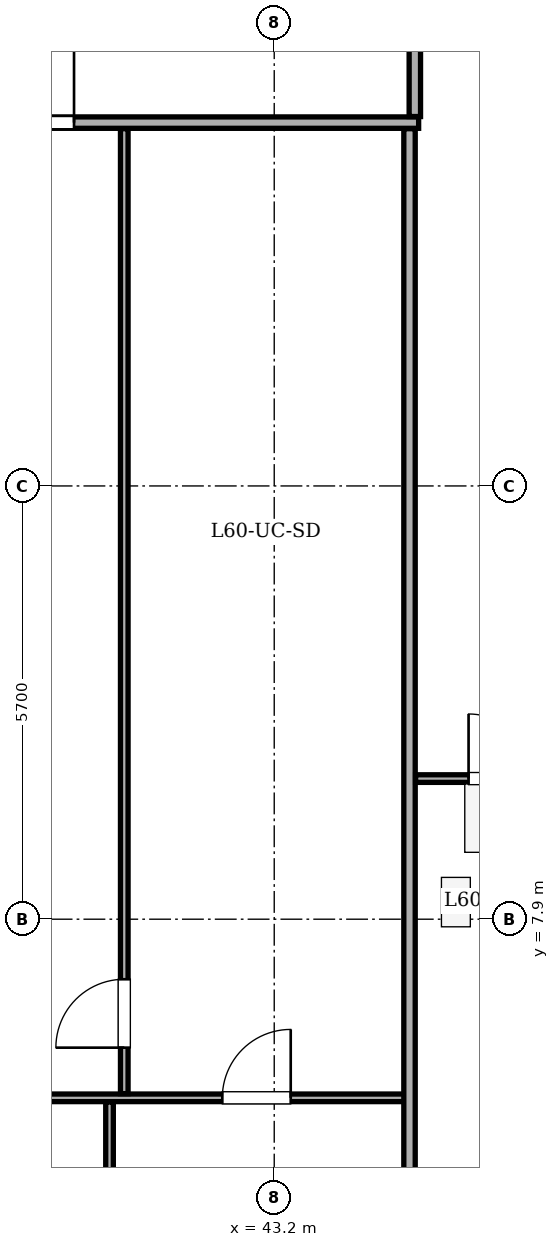
"""IFC4 building model, lengths in metres.
Left out: names, types, materials, properties, quantities, classifications, styles, units other than length and angle.
Written with IfcOpenShell. Run it as: python <this file> out.ifc"""

import sys

from ifc_helpers import new_model, si_unit, direction, frame, frame_2d, origin, place, context, subcontext, project, spatial, rectangle, extrude, element, fill, save


model = new_model("IFC4")
c1 = context("Model", 3, precision=1e-05, world=origin(), true_north=direction((0.0, 1.0)))
c2 = subcontext(c1, "Body", "Model", "MODEL_VIEW")
j1 = project(units=[si_unit("LENGTHUNIT", "METRE"), si_unit("PLANEANGLEUNIT", "RADIAN")], contexts=[c1])
p1 = place(None, origin())
s1 = spatial("IfcSite", under=j1, at=p1, CompositionType="ELEMENT")
p2 = place(p1, origin())
s2 = spatial("IfcBuilding", under=s1, at=p2, CompositionType="ELEMENT")
p3 = place(p2, frame((0.0, 0.0, 231.3)))
s3 = spatial("IfcBuildingStorey", under=s2, at=p3, CompositionType="ELEMENT", Elevation=231.3)
p4 = place(p3, frame((15.08, 18.38, 0.0), z_axis=(0.0, 0.0, 1.0), x_axis=(1.0, 0.0, 0.0)))
e1 = element("IfcWall", 1, at=p4, inside=s3, PredefinedType="PARTITIONING", context=c2, shape_type="SweptSolid", body=[
    extrude(rectangle(XDim=30.02, YDim=0.15, at=frame_2d((15.01, 0.0))), origin(), (0.0, 0.0, 1.0), 3.1),
])
p5 = place(p4, frame((4.385, 0.0, 0.0)))
e2 = element("IfcOpeningElement", 2, at=p5, cuts=e1, PredefinedType="OPENING", context=c2, shape_type="SweptSolid", body=[
    extrude(rectangle(XDim=1.0, YDim=2.1, at=frame_2d((0.5, 1.05))), frame((0.0, 0.085, 0.0), z_axis=(0.0, -1.0, 0.0), x_axis=(1.0, 0.0, 0.0)), (0.0, 0.0, 1.0), 0.17),
])
p6 = place(p4, frame((14.361, 0.0, 0.0)))
e3 = element("IfcOpeningElement", 3, at=p6, cuts=e1, PredefinedType="OPENING", context=c2, shape_type="SweptSolid", body=[
    extrude(rectangle(XDim=1.0, YDim=2.1, at=frame_2d((0.5, 1.05))), frame((0.0, 0.085, 0.0), z_axis=(0.0, -1.0, 0.0), x_axis=(1.0, 0.0, 0.0)), (0.0, 0.0, 1.0), 0.17),
])
p7 = place(p4, frame((24.486, 0.0, 0.0)))
e4 = element("IfcOpeningElement", 4, at=p7, cuts=e1, PredefinedType="OPENING", context=c2, shape_type="SweptSolid", body=[
    extrude(rectangle(XDim=1.0, YDim=2.1, at=frame_2d((0.5, 1.05))), frame((0.0, 0.085, 0.0), z_axis=(0.0, -1.0, 0.0), x_axis=(1.0, 0.0, 0.0)), (0.0, 0.0, 1.0), 0.17),
])
p8 = place(p3, frame((35.233, 5.55, 0.0), z_axis=(0.0, 0.0, 1.0), x_axis=(1.0, 0.0, 0.0)))
e5 = element("IfcWall", 5, at=p8, inside=s3, PredefinedType="PARTITIONING", context=c2, shape_type="SweptSolid", body=[
    extrude(rectangle(XDim=9.787, YDim=0.1, at=frame_2d((4.894, 0.0))), origin(), (0.0, 0.0, 1.0), 3.1),
])
p9 = place(p8, frame((0.625, 0.0, 0.0)))
e6 = element("IfcOpeningElement", 6, at=p9, cuts=e5, PredefinedType="OPENING", context=c2, shape_type="SweptSolid", body=[
    extrude(rectangle(XDim=0.85, YDim=2.05, at=frame_2d((0.425, 1.025))), frame((0.0, 0.06, 0.0), z_axis=(0.0, -1.0, 0.0), x_axis=(1.0, 0.0, 0.0)), (0.0, 0.0, 1.0), 0.12),
])
p10 = place(p8, frame((3.525, 0.0, 0.0)))
e7 = element("IfcOpeningElement", 7, at=p10, cuts=e5, PredefinedType="OPENING", context=c2, shape_type="SweptSolid", body=[
    extrude(rectangle(XDim=0.85, YDim=2.05, at=frame_2d((0.425, 1.025))), frame((0.0, 0.06, 0.0), z_axis=(0.0, -1.0, 0.0), x_axis=(1.0, 0.0, 0.0)), (0.0, 0.0, 1.0), 0.12),
])
p11 = place(p8, frame((7.284, 0.0, 0.0)))
e8 = element("IfcOpeningElement", 8, at=p11, cuts=e5, PredefinedType="OPENING", context=c2, shape_type="SweptSolid", body=[
    extrude(rectangle(XDim=0.9, YDim=2.05, at=frame_2d((0.45, 1.025))), frame((0.0, 0.06, 0.0), z_axis=(0.0, -1.0, 0.0), x_axis=(1.0, 0.0, 0.0)), (0.0, 0.0, 1.0), 0.12),
])
p12 = place(p3, frame((41.227, 5.605, 0.0), z_axis=(0.0, 0.0, 1.0), x_axis=(0.0, 1.0, 0.0)))
e9 = element("IfcWall", 9, at=p12, inside=s3, PredefinedType="PARTITIONING", context=c2, shape_type="SweptSolid", body=[
    extrude(rectangle(XDim=12.695, YDim=0.1, at=frame_2d((6.348, 0.0))), origin(), (0.0, 0.0, 1.0), 3.1),
])
p13 = place(p12, frame((0.605, 0.0, 0.0)))
e10 = element("IfcOpeningElement", 10, at=p13, cuts=e9, PredefinedType="OPENING", context=c2, shape_type="SweptSolid", body=[
    extrude(rectangle(XDim=0.9, YDim=2.05, at=frame_2d((0.45, 1.025))), frame((0.0, 0.06, 0.0), z_axis=(0.0, -1.0, 0.0), x_axis=(1.0, 0.0, 0.0)), (0.0, 0.0, 1.0), 0.12),
])
p14 = place(p3, frame((41.033, 3.045, 0.0), z_axis=(0.0, 0.0, 1.0), x_axis=(0.0, 1.0, 0.0)))
e11 = element("IfcWall", 11, at=p14, inside=s3, PredefinedType="PARTITIONING", context=c2, shape_type="SweptSolid", body=[
    extrude(rectangle(XDim=2.45, YDim=0.1, at=frame_2d((1.225, 0.0))), origin(), (0.0, 0.0, 1.0), 3.1),
])
p15 = place(p3, frame((44.98, 3.045, 0.0), z_axis=(0.0, 0.0, 1.0), x_axis=(0.0, 1.0, 0.0)))
e12 = element("IfcWall", 12, at=p15, inside=s3, PredefinedType="PARTITIONING", context=c2, shape_type="SweptSolid", body=[
    extrude(rectangle(XDim=15.255, YDim=0.15, at=frame_2d((7.627, 0.0))), origin(), (0.0, 0.0, 1.0), 2.725),
])
p16 = place(p3, frame((45.05, 18.46, 0.0), z_axis=(0.0, 0.0, 1.0), x_axis=(0.0, 1.0, 0.0)))
e13 = element("IfcWall", 13, at=p16, inside=s3, PredefinedType="PARTITIONING", context=c2, shape_type="SweptSolid", body=[
    extrude(rectangle(XDim=1.79, YDim=0.15, at=frame_2d((0.895, 0.0))), origin(), (0.0, 0.0, 1.0), 2.725),
])
p17 = place(p3, frame((45.06, 9.75, 0.0), z_axis=(0.0, 0.0, 1.0), x_axis=(1.0, 0.0, 0.0)))
e14 = element("IfcWall", 14, at=p17, inside=s3, PredefinedType="PARTITIONING", context=c2, shape_type="SweptSolid", body=[
    extrude(rectangle(XDim=10.295, YDim=0.1, at=frame_2d((5.147, 0.0))), origin(), (0.0, 0.0, 1.0), 3.1),
])
p18 = place(p17, frame((0.697, 0.0, 0.0)))
e15 = element("IfcOpeningElement", 15, at=p18, cuts=e14, PredefinedType="OPENING", context=c2, shape_type="SweptSolid", body=[
    extrude(rectangle(XDim=0.85, YDim=2.05, at=frame_2d((0.425, 1.025))), frame((0.0, 0.06, 0.0), z_axis=(0.0, -1.0, 0.0), x_axis=(1.0, 0.0, 0.0)), (0.0, 0.0, 1.0), 0.12),
])
p19 = place(p17, frame((3.068, 0.0, 0.0)))
e16 = element("IfcOpeningElement", 16, at=p19, cuts=e14, PredefinedType="OPENING", context=c2, shape_type="SweptSolid", body=[
    extrude(rectangle(XDim=0.85, YDim=2.05, at=frame_2d((0.425, 1.025))), frame((0.0, 0.06, 0.0), z_axis=(0.0, -1.0, 0.0), x_axis=(1.0, 0.0, 0.0)), (0.0, 0.0, 1.0), 0.12),
])
p20 = place(p17, frame((5.384, 0.0, 0.0)))
e17 = element("IfcOpeningElement", 17, at=p20, cuts=e14, PredefinedType="OPENING", context=c2, shape_type="SweptSolid", body=[
    extrude(rectangle(XDim=0.9, YDim=2.05, at=frame_2d((0.45, 1.025))), frame((0.0, 0.06, 0.0), z_axis=(0.0, -1.0, 0.0), x_axis=(1.0, 0.0, 0.0)), (0.0, 0.0, 1.0), 0.12),
])
p21 = place(p17, frame((8.208, 0.0, 0.0)))
e18 = element("IfcOpeningElement", 18, at=p21, cuts=e14, PredefinedType="OPENING", context=c2, shape_type="SweptSolid", body=[
    extrude(rectangle(XDim=0.9, YDim=2.05, at=frame_2d((0.45, 1.025))), frame((0.0, 0.06, 0.0), z_axis=(0.0, -1.0, 0.0), x_axis=(1.0, 0.0, 0.0)), (0.0, 0.0, 1.0), 0.12),
])
p22 = place(p7, origin())
e19 = element("IfcDoor", 19, at=p22, inside=s3, OperationType="SINGLE_SWING_RIGHT", PredefinedType="DOOR", context=c2, shape_type="SweptSolid", body=[
    extrude(rectangle(XDim=1.0, YDim=2.1, at=frame_2d((0.5, 1.05))), frame((0.0, 0.025, 0.0), z_axis=(0.0, -1.0, 0.0), x_axis=(1.0, 0.0, 0.0)), (0.0, 0.0, 1.0), 0.05),
])
fill(e4, e19)
p23 = place(p13, origin())
e20 = element("IfcDoor", 20, at=p23, inside=s3, OperationType="SINGLE_SWING_LEFT", PredefinedType="DOOR", context=c2, shape_type="SweptSolid", body=[
    extrude(rectangle(XDim=0.9, YDim=2.05, at=frame_2d((0.45, 1.025))), frame((0.0, 0.025, 0.0), z_axis=(0.0, -1.0, 0.0), x_axis=(1.0, 0.0, 0.0)), (0.0, 0.0, 1.0), 0.05),
])
fill(e10, e20)
p24 = place(p11, origin())
e21 = element("IfcDoor", 21, at=p24, inside=s3, OperationType="SINGLE_SWING_RIGHT", PredefinedType="DOOR", context=c2, shape_type="SweptSolid", body=[
    extrude(rectangle(XDim=0.9, YDim=2.05, at=frame_2d((0.45, 1.025))), frame((0.0, 0.025, 0.0), z_axis=(0.0, -1.0, 0.0), x_axis=(1.0, 0.0, 0.0)), (0.0, 0.0, 1.0), 0.05),
])
fill(e8, e21)
p25 = place(p18, origin())
e22 = element("IfcDoor", 22, at=p25, inside=s3, OperationType="SINGLE_SWING_LEFT", PredefinedType="DOOR", context=c2, shape_type="SweptSolid", body=[
    extrude(rectangle(XDim=0.85, YDim=2.05, at=frame_2d((0.425, 1.025))), frame((0.0, 0.025, 0.0), z_axis=(0.0, -1.0, 0.0), x_axis=(1.0, 0.0, 0.0)), (0.0, 0.0, 1.0), 0.05),
])
fill(e15, e22)
save(model, sys.argv[1])
